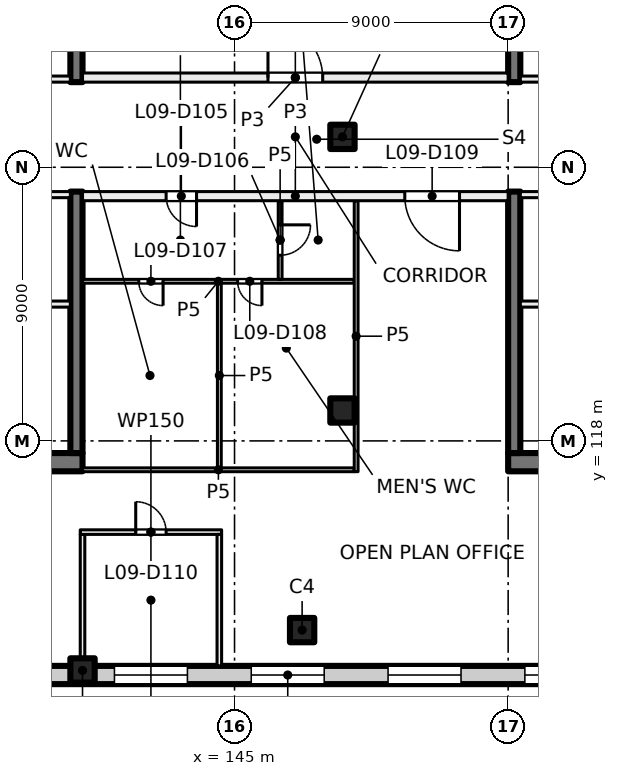
"""IFC4 building model, lengths in metres.
Left out: names, types, materials, properties, quantities, classifications, styles, units other than length and angle.
Written with IfcOpenShell. Run it as: python <this file> out.ifc"""

import sys

from ifc_helpers import new_model, si_unit, direction, frame, frame_2d, origin, origin_2d, place, context, subcontext, project, spatial, rectangle, extrude, element, fill, save


model = new_model("IFC4")
c1 = context("Model", 3, precision=1e-05, world=origin(), true_north=direction((0.0, 1.0)))
c2 = subcontext(c1, "Body", "Model", "MODEL_VIEW")
j1 = project(units=[si_unit("LENGTHUNIT", "METRE"), si_unit("PLANEANGLEUNIT", "RADIAN")], contexts=[c1])
p1 = place(None, origin())
s1 = spatial("IfcSite", under=j1, at=p1, CompositionType="ELEMENT")
p2 = place(p1, origin())
s2 = spatial("IfcBuilding", under=s1, at=p2, CompositionType="ELEMENT")
p3 = place(p2, frame((0.0, 0.0, 43.5)))
s3 = spatial("IfcBuildingStorey", under=s2, at=p3, CompositionType="ELEMENT", Elevation=43.5)
for number, where, z_axis, x_axis in (
    (1, (148.55, 119.0, 0.0), (0.0, 0.0, 1.0), (1.0, 0.0, 0.0)),
    (2, (148.55, 128.0, 0.0), (0.0, 0.0, 1.0), (1.0, 0.0, 0.0)),
    (3, (140.0, 110.45, 0.0), (0.0, 0.0, 1.0), (1.0, 0.0, 0.0)),
    (4, (147.223, 111.777, 0.0), (0.0, 0.0, 1.0), (1.0, 0.0, 0.0)),
):
    element("IfcColumn", number, at=place(p3, frame(where, z_axis=z_axis, x_axis=x_axis)), inside=s3, PredefinedType="COLUMN", context=c2, shape_type="SweptSolid", body=[
        extrude(rectangle(XDim=0.8, YDim=0.8, at=origin_2d()), origin(), (0.0, 0.0, 1.0), 4.0),
    ])
p4 = place(p3, frame((135.4, 117.3, 0.0), z_axis=(0.0, 0.0, 1.0), x_axis=(1.0, 0.0, 0.0)))
e5 = element("IfcWall", 5, at=p4, inside=s3, PredefinedType="SHEAR", context=c2, shape_type="SweptSolid", body=[
    extrude(rectangle(XDim=4.6, YDim=0.6, at=frame_2d((2.3, 0.0))), origin(), (0.0, 0.0, 1.0), 4.0),
])
for number, where, z_axis, x_axis in (
    (6, (139.8, 117.6, 0.0), (0.0, 0.0, 1.0), (0.0, 1.0, 0.0)),
    (7, (139.8, 129.8, 0.0), (0.0, 0.0, 1.0), (0.0, 1.0, 0.0)),
):
    element("IfcWall", number, at=place(p3, frame(where, z_axis=z_axis, x_axis=x_axis)), inside=s3, PredefinedType="SHEAR", context=c2, shape_type="SweptSolid", body=[
        extrude(rectangle(XDim=8.6, YDim=0.4, at=frame_2d((4.3, 0.0))), origin(), (0.0, 0.0, 1.0), 4.0),
    ])
p5 = place(p3, frame((158.6, 117.3, 0.0), z_axis=(0.0, 0.0, 1.0), x_axis=(-1.0, 0.0, 0.0)))
e8 = element("IfcWall", 8, at=p5, inside=s3, PredefinedType="SHEAR", context=c2, shape_type="SweptSolid", body=[
    extrude(rectangle(XDim=4.6, YDim=0.6, at=frame_2d((2.3, 0.0))), origin(), (0.0, 0.0, 1.0), 4.0),
])
for number, where, z_axis, x_axis in (
    (9, (154.2, 138.4, 0.0), (0.0, 0.0, 1.0), (0.0, -1.0, 0.0)),
    (10, (154.2, 126.2, 0.0), (0.0, 0.0, 1.0), (0.0, -1.0, 0.0)),
):
    element("IfcWall", number, at=place(p3, frame(where, z_axis=z_axis, x_axis=x_axis)), inside=s3, PredefinedType="SHEAR", context=c2, shape_type="SweptSolid", body=[
        extrude(rectangle(XDim=8.6, YDim=0.4, at=frame_2d((4.3, 0.0))), origin(), (0.0, 0.0, 1.0), 4.0),
    ])
p6 = place(p3, frame((162.93, 110.3, 0.0), z_axis=(0.0, 0.0, 1.0), x_axis=(-1.0, 0.0, 0.0)))
e11 = element("IfcWall", 11, at=p6, inside=s3, PredefinedType="SOLIDWALL", context=c2, shape_type="SweptSolid", body=[
    extrude(rectangle(XDim=31.93, YDim=0.6, at=frame_2d((15.965, 0.0))), origin(), (0.0, 0.0, 1.0), 3.625),
])
p7 = place(p6, frame((1.48, 0.0, 0.9)))
e12 = element("IfcOpeningElement", 12, at=p7, cuts=e11, PredefinedType="OPENING", context=c2, shape_type="SweptSolid", body=[
    extrude(rectangle(XDim=2.4, YDim=2.4, at=frame_2d((1.2, 1.2))), frame((0.0, 0.31, 0.0), z_axis=(0.0, -1.0, 0.0), x_axis=(1.0, 0.0, 0.0)), (0.0, 0.0, 1.0), 0.62),
])
p8 = place(p6, frame((5.98, 0.0, 0.9)))
e13 = element("IfcOpeningElement", 13, at=p8, cuts=e11, PredefinedType="OPENING", context=c2, shape_type="SweptSolid", body=[
    extrude(rectangle(XDim=2.4, YDim=2.4, at=frame_2d((1.2, 1.2))), frame((0.0, 0.31, 0.0), z_axis=(0.0, -1.0, 0.0), x_axis=(1.0, 0.0, 0.0)), (0.0, 0.0, 1.0), 0.62),
])
p9 = place(p6, frame((10.48, 0.0, 0.9)))
e14 = element("IfcOpeningElement", 14, at=p9, cuts=e11, PredefinedType="OPENING", context=c2, shape_type="SweptSolid", body=[
    extrude(rectangle(XDim=2.4, YDim=2.4, at=frame_2d((1.2, 1.2))), frame((0.0, 0.31, 0.0), z_axis=(0.0, -1.0, 0.0), x_axis=(1.0, 0.0, 0.0)), (0.0, 0.0, 1.0), 0.62),
])
p10 = place(p6, frame((14.98, 0.0, 0.9)))
e15 = element("IfcOpeningElement", 15, at=p10, cuts=e11, PredefinedType="OPENING", context=c2, shape_type="SweptSolid", body=[
    extrude(rectangle(XDim=2.4, YDim=2.4, at=frame_2d((1.2, 1.2))), frame((0.0, 0.31, 0.0), z_axis=(0.0, -1.0, 0.0), x_axis=(1.0, 0.0, 0.0)), (0.0, 0.0, 1.0), 0.62),
])
p11 = place(p6, frame((19.48, 0.0, 0.9)))
e16 = element("IfcOpeningElement", 16, at=p11, cuts=e11, PredefinedType="OPENING", context=c2, shape_type="SweptSolid", body=[
    extrude(rectangle(XDim=2.4, YDim=2.4, at=frame_2d((1.2, 1.2))), frame((0.0, 0.31, 0.0), z_axis=(0.0, -1.0, 0.0), x_axis=(1.0, 0.0, 0.0)), (0.0, 0.0, 1.0), 0.62),
])
p12 = place(p6, frame((23.98, 0.0, 0.9)))
e17 = element("IfcOpeningElement", 17, at=p12, cuts=e11, PredefinedType="OPENING", context=c2, shape_type="SweptSolid", body=[
    extrude(rectangle(XDim=2.4, YDim=2.4, at=frame_2d((1.2, 1.2))), frame((0.0, 0.31, 0.0), z_axis=(0.0, -1.0, 0.0), x_axis=(1.0, 0.0, 0.0)), (0.0, 0.0, 1.0), 0.62),
])
p13 = place(p6, frame((28.48, 0.0, 0.9)))
e18 = element("IfcOpeningElement", 18, at=p13, cuts=e11, PredefinedType="OPENING", context=c2, shape_type="SweptSolid", body=[
    extrude(rectangle(XDim=2.4, YDim=2.4, at=frame_2d((1.2, 1.2))), frame((0.0, 0.31, 0.0), z_axis=(0.0, -1.0, 0.0), x_axis=(1.0, 0.0, 0.0)), (0.0, 0.0, 1.0), 0.62),
])
p14 = place(p3, frame((135.0, 129.9, 0.0), z_axis=(0.0, 0.0, 1.0), x_axis=(1.0, 0.0, 0.0)))
e19 = element("IfcWall", 19, at=p14, inside=s3, PredefinedType="PARTITIONING", context=c2, shape_type="SweptSolid", body=[
    extrude(rectangle(XDim=4.6, YDim=0.2, at=frame_2d((2.3, 0.0))), origin(), (0.0, 0.0, 1.0), 3.625),
])
p15 = place(p14, frame((1.7, 0.0, 0.0)))
e20 = element("IfcOpeningElement", 20, at=p15, cuts=e19, PredefinedType="OPENING", context=c2, shape_type="SweptSolid", body=[
    extrude(rectangle(XDim=1.2, YDim=2.1, at=frame_2d((0.6, 1.05))), frame((0.0, 0.11, 0.0), z_axis=(0.0, -1.0, 0.0), x_axis=(1.0, 0.0, 0.0)), (0.0, 0.0, 1.0), 0.22),
])
p16 = place(p3, frame((139.6, 126.1, 0.0), z_axis=(0.0, 0.0, 1.0), x_axis=(-1.0, 0.0, 0.0)))
e21 = element("IfcWall", 21, at=p16, inside=s3, PredefinedType="PARTITIONING", context=c2, shape_type="SweptSolid", body=[
    extrude(rectangle(XDim=4.6, YDim=0.2, at=frame_2d((2.3, 0.0))), origin(), (0.0, 0.0, 1.0), 3.625),
])
p17 = place(p16, frame((1.7, 0.0, 0.0)))
e22 = element("IfcOpeningElement", 22, at=p17, cuts=e21, PredefinedType="OPENING", context=c2, shape_type="SweptSolid", body=[
    extrude(rectangle(XDim=1.2, YDim=2.1, at=frame_2d((0.6, 1.05))), frame((0.0, 0.11, 0.0), z_axis=(0.0, -1.0, 0.0), x_axis=(1.0, 0.0, 0.0)), (0.0, 0.0, 1.0), 0.22),
])
p18 = place(p3, frame((139.6, 122.5, 0.0), z_axis=(0.0, 0.0, 1.0), x_axis=(-1.0, 0.0, 0.0)))
e23 = element("IfcWall", 23, at=p18, inside=s3, PredefinedType="PARTITIONING", context=c2, shape_type="SweptSolid", body=[
    extrude(rectangle(XDim=4.6, YDim=0.2, at=frame_2d((2.3, 0.0))), origin(), (0.0, 0.0, 1.0), 3.625),
])
p19 = place(p18, frame((1.35, 0.0, 0.0)))
e24 = element("IfcOpeningElement", 24, at=p19, cuts=e23, PredefinedType="OPENING", context=c2, shape_type="SweptSolid", body=[
    extrude(rectangle(XDim=1.5, YDim=2.1, at=frame_2d((0.75, 1.05))), frame((0.0, 0.11, 0.0), z_axis=(0.0, -1.0, 0.0), x_axis=(1.0, 0.0, 0.0)), (0.0, 0.0, 1.0), 0.22),
])
p20 = place(p3, frame((163.8, 126.1, 0.0), z_axis=(0.0, 0.0, 1.0), x_axis=(-1.0, 0.0, 0.0)))
e25 = element("IfcWall", 25, at=p20, inside=s3, PredefinedType="PARTITIONING", context=c2, shape_type="SweptSolid", body=[
    extrude(rectangle(XDim=9.4, YDim=0.2, at=frame_2d((4.7, 0.0))), origin(), (0.0, 0.0, 1.0), 3.625),
])
p21 = place(p20, frame((4.1, 0.0, 0.0)))
e26 = element("IfcOpeningElement", 26, at=p21, cuts=e25, PredefinedType="OPENING", context=c2, shape_type="SweptSolid", body=[
    extrude(rectangle(XDim=1.2, YDim=2.1, at=frame_2d((0.6, 1.05))), frame((0.0, 0.11, 0.0), z_axis=(0.0, -1.0, 0.0), x_axis=(1.0, 0.0, 0.0)), (0.0, 0.0, 1.0), 0.22),
])
p22 = place(p3, frame((163.8, 122.5, 0.0), z_axis=(0.0, 0.0, 1.0), x_axis=(-1.0, 0.0, 0.0)))
e27 = element("IfcWall", 27, at=p22, inside=s3, PredefinedType="PARTITIONING", context=c2, shape_type="SweptSolid", body=[
    extrude(rectangle(XDim=9.4, YDim=0.2, at=frame_2d((4.7, 0.0))), origin(), (0.0, 0.0, 1.0), 3.625),
])
p23 = place(p22, frame((6.55, 0.0, 0.0)))
e28 = element("IfcOpeningElement", 28, at=p23, cuts=e27, PredefinedType="OPENING", context=c2, shape_type="SweptSolid", body=[
    extrude(rectangle(XDim=1.5, YDim=2.1, at=frame_2d((0.75, 1.05))), frame((0.0, 0.11, 0.0), z_axis=(0.0, -1.0, 0.0), x_axis=(1.0, 0.0, 0.0)), (0.0, 0.0, 1.0), 0.22),
])
p24 = place(p3, frame((154.4, 129.9, 0.0), z_axis=(0.0, 0.0, 1.0), x_axis=(1.0, 0.0, 0.0)))
e29 = element("IfcWall", 29, at=p24, inside=s3, PredefinedType="PARTITIONING", context=c2, shape_type="SweptSolid", body=[
    extrude(rectangle(XDim=9.4, YDim=0.2, at=frame_2d((4.7, 0.0))), origin(), (0.0, 0.0, 1.0), 3.625),
])
p25 = place(p24, frame((4.1, 0.0, 0.0)))
e30 = element("IfcOpeningElement", 30, at=p25, cuts=e29, PredefinedType="OPENING", context=c2, shape_type="SweptSolid", body=[
    extrude(rectangle(XDim=1.2, YDim=2.1, at=frame_2d((0.6, 1.05))), frame((0.0, 0.11, 0.0), z_axis=(0.0, -1.0, 0.0), x_axis=(1.0, 0.0, 0.0)), (0.0, 0.0, 1.0), 0.22),
])
p26 = place(p3, frame((140.0, 110.6, 0.0), z_axis=(0.0, 0.0, 1.0), x_axis=(0.0, 1.0, 0.0)))
e31 = element("IfcWall", 31, at=p26, inside=s3, PredefinedType="PARTITIONING", context=c2, shape_type="SweptSolid", body=[
    extrude(rectangle(XDim=4.325, YDim=0.15, at=frame_2d((2.163, 0.0))), origin(), (0.0, 0.0, 1.0), 3.625),
])
p27 = place(p3, frame((139.925, 115.0, 0.0), z_axis=(0.0, 0.0, 1.0), x_axis=(1.0, 0.0, 0.0)))
e32 = element("IfcWall", 32, at=p27, inside=s3, PredefinedType="PARTITIONING", context=c2, shape_type="SweptSolid", body=[
    extrude(rectangle(XDim=4.65, YDim=0.15, at=frame_2d((2.325, 0.0))), origin(), (0.0, 0.0, 1.0), 3.625),
])
p28 = place(p27, frame((1.825, 0.0, 0.0)))
e33 = element("IfcOpeningElement", 33, at=p28, cuts=e32, PredefinedType="OPENING", context=c2, shape_type="SweptSolid", body=[
    extrude(rectangle(XDim=1.0, YDim=2.1, at=frame_2d((0.5, 1.05))), frame((0.0, 0.085, 0.0), z_axis=(0.0, -1.0, 0.0), x_axis=(1.0, 0.0, 0.0)), (0.0, 0.0, 1.0), 0.17),
])
p29 = place(p3, frame((140.0, 117.05, 0.0), z_axis=(0.0, 0.0, 1.0), x_axis=(1.0, 0.0, 0.0)))
e34 = element("IfcWall", 34, at=p29, inside=s3, PredefinedType="PARTITIONING", context=c2, shape_type="SweptSolid", body=[
    extrude(rectangle(XDim=8.938, YDim=0.125, at=frame_2d((4.469, 0.0))), origin(), (0.0, 0.0, 1.0), 3.625),
])
p30 = place(p3, frame((148.938, 123.25, 0.0), z_axis=(0.0, 0.0, 1.0), x_axis=(-1.0, 0.0, 0.0)))
e35 = element("IfcWall", 35, at=p30, inside=s3, PredefinedType="PARTITIONING", context=c2, shape_type="SweptSolid", body=[
    extrude(rectangle(XDim=8.938, YDim=0.125, at=frame_2d((4.469, 0.0))), origin(), (0.0, 0.0, 1.0), 3.625),
])
p31 = place(p30, frame((6.288, 0.0, 0.0)))
e36 = element("IfcOpeningElement", 36, at=p31, cuts=e35, PredefinedType="OPENING", context=c2, shape_type="SweptSolid", body=[
    extrude(rectangle(XDim=0.8, YDim=2.1, at=frame_2d((0.4, 1.05))), frame((0.0, 0.073, 0.0), z_axis=(0.0, -1.0, 0.0), x_axis=(1.0, 0.0, 0.0)), (0.0, 0.0, 1.0), 0.145),
])
p32 = place(p30, frame((3.037, 0.0, 0.0)))
e37 = element("IfcOpeningElement", 37, at=p32, cuts=e35, PredefinedType="OPENING", context=c2, shape_type="SweptSolid", body=[
    extrude(rectangle(XDim=0.8, YDim=2.1, at=frame_2d((0.4, 1.05))), frame((0.0, 0.073, 0.0), z_axis=(0.0, -1.0, 0.0), x_axis=(1.0, 0.0, 0.0)), (0.0, 0.0, 1.0), 0.145),
])
p33 = place(p3, frame((140.0, 129.95, 0.0), z_axis=(0.0, 0.0, 1.0), x_axis=(1.0, 0.0, 0.0)))
e38 = element("IfcWall", 38, at=p33, inside=s3, PredefinedType="PARTITIONING", context=c2, shape_type="SweptSolid", body=[
    extrude(rectangle(XDim=14.0, YDim=0.3, at=frame_2d((7.0, 0.0))), origin(), (0.0, 0.0, 1.0), 3.625),
])
p34 = place(p33, frame((6.1, 0.0, 0.0)))
e39 = element("IfcOpeningElement", 39, at=p34, cuts=e38, PredefinedType="OPENING", context=c2, shape_type="SweptSolid", body=[
    extrude(rectangle(XDim=1.8, YDim=2.1, at=frame_2d((0.9, 1.05))), frame((0.0, 0.16, 0.0), z_axis=(0.0, -1.0, 0.0), x_axis=(1.0, 0.0, 0.0)), (0.0, 0.0, 1.0), 0.32),
])
p35 = place(p3, frame((144.5, 114.925, 0.0), z_axis=(0.0, 0.0, 1.0), x_axis=(0.0, -1.0, 0.0)))
e40 = element("IfcWall", 40, at=p35, inside=s3, PredefinedType="PARTITIONING", context=c2, shape_type="SweptSolid", body=[
    extrude(rectangle(XDim=4.325, YDim=0.15, at=frame_2d((2.163, 0.0))), origin(), (0.0, 0.0, 1.0), 3.625),
])
p36 = place(p3, frame((144.5, 117.112, 0.0), z_axis=(0.0, 0.0, 1.0), x_axis=(0.0, 1.0, 0.0)))
e41 = element("IfcWall", 41, at=p36, inside=s3, PredefinedType="PARTITIONING", context=c2, shape_type="SweptSolid", body=[
    extrude(rectangle(XDim=6.076, YDim=0.125, at=frame_2d((3.038, 0.0))), origin(), (0.0, 0.0, 1.0), 3.625),
])
p37 = place(p3, frame((146.5, 125.9, 0.0), z_axis=(0.0, 0.0, 1.0), x_axis=(0.0, -1.0, 0.0)))
e42 = element("IfcWall", 42, at=p37, inside=s3, PredefinedType="PARTITIONING", context=c2, shape_type="SweptSolid", body=[
    extrude(rectangle(XDim=2.588, YDim=0.125, at=frame_2d((1.294, 0.0))), origin(), (0.0, 0.0, 1.0), 3.625),
])
p38 = place(p37, frame((0.794, 0.0, 0.0)))
e43 = element("IfcOpeningElement", 43, at=p38, cuts=e42, PredefinedType="OPENING", context=c2, shape_type="SweptSolid", body=[
    extrude(rectangle(XDim=1.0, YDim=2.1, at=frame_2d((0.5, 1.05))), frame((0.0, 0.073, 0.0), z_axis=(0.0, -1.0, 0.0), x_axis=(1.0, 0.0, 0.0)), (0.0, 0.0, 1.0), 0.145),
])
p39 = place(p3, frame((149.0, 116.988, 0.0), z_axis=(0.0, 0.0, 1.0), x_axis=(0.0, 1.0, 0.0)))
e44 = element("IfcWall", 44, at=p39, inside=s3, PredefinedType="PARTITIONING", context=c2, shape_type="SweptSolid", body=[
    extrude(rectangle(XDim=8.912, YDim=0.125, at=frame_2d((4.456, 0.0))), origin(), (0.0, 0.0, 1.0), 3.625),
])
p40 = place(p3, frame((154.0, 126.05, 0.0), z_axis=(0.0, 0.0, 1.0), x_axis=(-1.0, 0.0, 0.0)))
e45 = element("IfcWall", 45, at=p40, inside=s3, PredefinedType="PARTITIONING", context=c2, shape_type="SweptSolid", body=[
    extrude(rectangle(XDim=14.0, YDim=0.3, at=frame_2d((7.0, 0.0))), origin(), (0.0, 0.0, 1.0), 3.625),
])
p41 = place(p40, frame((10.25, 0.0, 0.0)))
e46 = element("IfcOpeningElement", 46, at=p41, cuts=e45, PredefinedType="OPENING", context=c2, shape_type="SweptSolid", body=[
    extrude(rectangle(XDim=1.0, YDim=2.1, at=frame_2d((0.5, 1.05))), frame((0.0, 0.16, 0.0), z_axis=(0.0, -1.0, 0.0), x_axis=(1.0, 0.0, 0.0)), (0.0, 0.0, 1.0), 0.32),
])
p42 = place(p40, frame((1.6, 0.0, 0.0)))
e47 = element("IfcOpeningElement", 47, at=p42, cuts=e45, PredefinedType="OPENING", context=c2, shape_type="SweptSolid", body=[
    extrude(rectangle(XDim=1.8, YDim=2.1, at=frame_2d((0.9, 1.05))), frame((0.0, 0.16, 0.0), z_axis=(0.0, -1.0, 0.0), x_axis=(1.0, 0.0, 0.0)), (0.0, 0.0, 1.0), 0.32),
])
p43 = place(p8, origin())
e48 = element("IfcWindow", 48, at=p43, inside=s3, PartitioningType="SINGLE_PANEL", PredefinedType="WINDOW", context=c2, shape_type="SweptSolid", body=[
    extrude(rectangle(XDim=2.4, YDim=2.4, at=frame_2d((1.2, 1.2))), frame((0.0, 0.03, 0.0), z_axis=(0.0, -1.0, 0.0), x_axis=(1.0, 0.0, 0.0)), (0.0, 0.0, 1.0), 0.06),
])
fill(e13, e48)
p44 = place(p9, origin())
e49 = element("IfcWindow", 49, at=p44, inside=s3, PartitioningType="SINGLE_PANEL", PredefinedType="WINDOW", context=c2, shape_type="SweptSolid", body=[
    extrude(rectangle(XDim=2.4, YDim=2.4, at=frame_2d((1.2, 1.2))), frame((0.0, 0.03, 0.0), z_axis=(0.0, -1.0, 0.0), x_axis=(1.0, 0.0, 0.0)), (0.0, 0.0, 1.0), 0.06),
])
fill(e14, e49)
p45 = place(p10, origin())
e50 = element("IfcWindow", 50, at=p45, inside=s3, PartitioningType="SINGLE_PANEL", PredefinedType="WINDOW", context=c2, shape_type="SweptSolid", body=[
    extrude(rectangle(XDim=2.4, YDim=2.4, at=frame_2d((1.2, 1.2))), frame((0.0, 0.03, 0.0), z_axis=(0.0, -1.0, 0.0), x_axis=(1.0, 0.0, 0.0)), (0.0, 0.0, 1.0), 0.06),
])
fill(e15, e50)
p46 = place(p11, origin())
e51 = element("IfcWindow", 51, at=p46, inside=s3, PartitioningType="SINGLE_PANEL", PredefinedType="WINDOW", context=c2, shape_type="SweptSolid", body=[
    extrude(rectangle(XDim=2.4, YDim=2.4, at=frame_2d((1.2, 1.2))), frame((0.0, 0.03, 0.0), z_axis=(0.0, -1.0, 0.0), x_axis=(1.0, 0.0, 0.0)), (0.0, 0.0, 1.0), 0.06),
])
fill(e16, e51)
p47 = place(p34, origin())
e52 = element("IfcDoor", 52, at=p47, inside=s3, OperationType="DOUBLE_DOOR_SINGLE_SWING", PredefinedType="DOOR", context=c2, shape_type="SweptSolid", body=[
    extrude(rectangle(XDim=1.8, YDim=2.1, at=frame_2d((0.9, 1.05))), frame((0.0, 0.025, 0.0), z_axis=(0.0, -1.0, 0.0), x_axis=(1.0, 0.0, 0.0)), (0.0, 0.0, 1.0), 0.05),
])
fill(e39, e52)
p48 = place(p41, origin())
e53 = element("IfcDoor", 53, at=p48, inside=s3, OperationType="SINGLE_SWING_RIGHT", PredefinedType="DOOR", context=c2, shape_type="SweptSolid", body=[
    extrude(rectangle(XDim=1.0, YDim=2.1, at=frame_2d((0.5, 1.05))), frame((0.0, 0.025, 0.0), z_axis=(0.0, -1.0, 0.0), x_axis=(1.0, 0.0, 0.0)), (0.0, 0.0, 1.0), 0.05),
])
fill(e46, e53)
p49 = place(p38, origin())
e54 = element("IfcDoor", 54, at=p49, inside=s3, OperationType="SINGLE_SWING_RIGHT", PredefinedType="DOOR", context=c2, shape_type="SweptSolid", body=[
    extrude(rectangle(XDim=1.0, YDim=2.1, at=frame_2d((0.5, 1.05))), frame((0.0, 0.025, 0.0), z_axis=(0.0, -1.0, 0.0), x_axis=(1.0, 0.0, 0.0)), (0.0, 0.0, 1.0), 0.05),
])
fill(e43, e54)
p50 = place(p31, origin())
e55 = element("IfcDoor", 55, at=p50, inside=s3, OperationType="SINGLE_SWING_RIGHT", PredefinedType="DOOR", context=c2, shape_type="SweptSolid", body=[
    extrude(rectangle(XDim=0.8, YDim=2.1, at=frame_2d((0.4, 1.05))), frame((0.0, 0.025, 0.0), z_axis=(0.0, -1.0, 0.0), x_axis=(1.0, 0.0, 0.0)), (0.0, 0.0, 1.0), 0.05),
])
fill(e36, e55)
p51 = place(p32, origin())
e56 = element("IfcDoor", 56, at=p51, inside=s3, OperationType="SINGLE_SWING_LEFT", PredefinedType="DOOR", context=c2, shape_type="SweptSolid", body=[
    extrude(rectangle(XDim=0.8, YDim=2.1, at=frame_2d((0.4, 1.05))), frame((0.0, 0.025, 0.0), z_axis=(0.0, -1.0, 0.0), x_axis=(1.0, 0.0, 0.0)), (0.0, 0.0, 1.0), 0.05),
])
fill(e37, e56)
p52 = place(p42, origin())
e57 = element("IfcDoor", 57, at=p52, inside=s3, OperationType="DOUBLE_DOOR_SINGLE_SWING", PredefinedType="DOOR", context=c2, shape_type="SweptSolid", body=[
    extrude(rectangle(XDim=1.8, YDim=2.1, at=frame_2d((0.9, 1.05))), frame((0.0, 0.025, 0.0), z_axis=(0.0, -1.0, 0.0), x_axis=(1.0, 0.0, 0.0)), (0.0, 0.0, 1.0), 0.05),
])
fill(e47, e57)
p53 = place(p28, origin())
e58 = element("IfcDoor", 58, at=p53, inside=s3, OperationType="SINGLE_SWING_LEFT", PredefinedType="DOOR", context=c2, shape_type="SweptSolid", body=[
    extrude(rectangle(XDim=1.0, YDim=2.1, at=frame_2d((0.5, 1.05))), frame((0.0, 0.025, 0.0), z_axis=(0.0, -1.0, 0.0), x_axis=(1.0, 0.0, 0.0)), (0.0, 0.0, 1.0), 0.05),
])
fill(e33, e58)
save(model, sys.argv[1])
